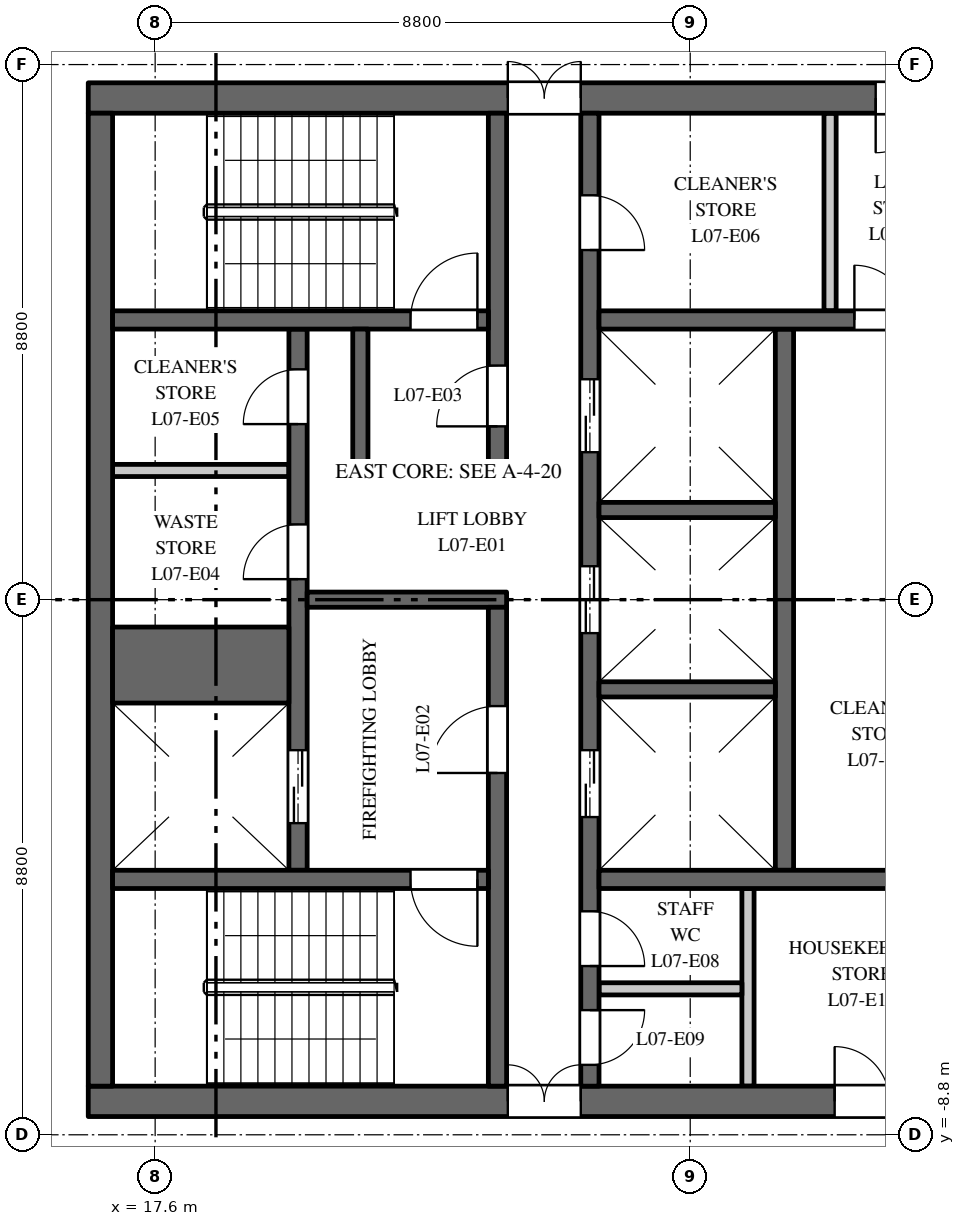
"""IFC4 building model, lengths in metres.
Left out: names, types, materials, properties, quantities, classifications, styles, units other than length and angle.
Written with IfcOpenShell. Run it as: python <this file> out.ifc"""

import sys

from ifc_helpers import new_model, si_unit, direction, frame, frame_2d, origin, place, context, subcontext, project, spatial, rectangle, extrude, element, fill, save


model = new_model("IFC4")
c1 = context("Model", 3, precision=1e-05, world=origin(), true_north=direction((0.0, 1.0)))
c2 = subcontext(c1, "Body", "Model", "MODEL_VIEW")
j1 = project(units=[si_unit("LENGTHUNIT", "METRE"), si_unit("PLANEANGLEUNIT", "RADIAN")], contexts=[c1])
p1 = place(None, origin())
s1 = spatial("IfcSite", under=j1, at=p1, CompositionType="ELEMENT")
p2 = place(p1, origin())
s2 = spatial("IfcBuilding", under=s1, at=p2, CompositionType="ELEMENT")
p3 = place(p2, frame((0.0, 0.0, 38.5)))
s3 = spatial("IfcBuildingStorey", under=s2, at=p3, CompositionType="ELEMENT", Elevation=38.5)
p4 = place(p3, frame((16.5, 8.25, 0.0), z_axis=(0.0, 0.0, 1.0), x_axis=(1.0, 0.0, 0.0)))
e1 = element("IfcWall", 1, at=p4, inside=s3, PredefinedType="SHEAR", context=c2, shape_type="SweptSolid", body=[
    extrude(rectangle(XDim=15.0, YDim=0.5, at=frame_2d((7.5, 0.0))), origin(), (0.0, 0.0, 1.0), 3.7),
])
p5 = place(p4, frame((6.9, 0.0, 0.0)))
e2 = element("IfcOpeningElement", 2, at=p5, cuts=e1, PredefinedType="OPENING", context=c2, shape_type="SweptSolid", body=[
    extrude(rectangle(XDim=1.2, YDim=2.1, at=frame_2d((0.6, 1.05))), frame((0.0, 0.26, 0.0), z_axis=(0.0, -1.0, 0.0), x_axis=(1.0, 0.0, 0.0)), (0.0, 0.0, 1.0), 0.52),
])
p6 = place(p4, frame((12.95, 0.0, 0.0)))
e3 = element("IfcOpeningElement", 3, at=p6, cuts=e1, PredefinedType="OPENING", context=c2, shape_type="SweptSolid", body=[
    extrude(rectangle(XDim=0.9, YDim=2.1, at=frame_2d((0.45, 1.05))), frame((0.0, 0.26, 0.0), z_axis=(0.0, -1.0, 0.0), x_axis=(1.0, 0.0, 0.0)), (0.0, 0.0, 1.0), 0.52),
])
p7 = place(p3, frame((16.5, -8.25, 0.0), z_axis=(0.0, 0.0, 1.0), x_axis=(1.0, 0.0, 0.0)))
e4 = element("IfcWall", 4, at=p7, inside=s3, PredefinedType="SHEAR", context=c2, shape_type="SweptSolid", body=[
    extrude(rectangle(XDim=15.0, YDim=0.5, at=frame_2d((7.5, 0.0))), origin(), (0.0, 0.0, 1.0), 3.7),
])
p8 = place(p7, frame((6.9, 0.0, 0.0)))
e5 = element("IfcOpeningElement", 5, at=p8, cuts=e4, PredefinedType="OPENING", context=c2, shape_type="SweptSolid", body=[
    extrude(rectangle(XDim=1.2, YDim=2.1, at=frame_2d((0.6, 1.05))), frame((0.0, 0.26, 0.0), z_axis=(0.0, -1.0, 0.0), x_axis=(1.0, 0.0, 0.0)), (0.0, 0.0, 1.0), 0.52),
])
p9 = place(p7, frame((12.275, 0.0, 0.0)))
e6 = element("IfcOpeningElement", 6, at=p9, cuts=e4, PredefinedType="OPENING", context=c2, shape_type="SweptSolid", body=[
    extrude(rectangle(XDim=0.9, YDim=2.1, at=frame_2d((0.45, 1.05))), frame((0.0, 0.26, 0.0), z_axis=(0.0, -1.0, 0.0), x_axis=(1.0, 0.0, 0.0)), (0.0, 0.0, 1.0), 0.52),
])
p10 = place(p3, frame((16.9, 2.125, 0.0), z_axis=(0.0, 0.0, 1.0), x_axis=(1.0, 0.0, 0.0)))
e7 = element("IfcWall", 7, at=p10, inside=s3, PredefinedType="PARTITIONING", context=c2, shape_type="SweptSolid", body=[
    extrude(rectangle(XDim=2.9, YDim=0.2, at=frame_2d((1.45, 0.0))), origin(), (0.0, 0.0, 1.0), 3.7),
])
p11 = place(p3, frame((27.95, -4.45, 0.0), z_axis=(0.0, 0.0, 1.0), x_axis=(0.0, 1.0, 0.0)))
e8 = element("IfcWall", 8, at=p11, inside=s3, PredefinedType="SHEAR", context=c2, shape_type="SweptSolid", body=[
    extrude(rectangle(XDim=8.9, YDim=0.3, at=frame_2d((4.45, 0.0))), origin(), (0.0, 0.0, 1.0), 3.7),
])
p12 = place(p3, frame((19.95, -4.45, 0.0), z_axis=(0.0, 0.0, 1.0), x_axis=(0.0, 1.0, 0.0)))
e9 = element("IfcWall", 9, at=p12, inside=s3, PredefinedType="SHEAR", context=c2, shape_type="SweptSolid", body=[
    extrude(rectangle(XDim=8.9, YDim=0.3, at=frame_2d((4.45, 0.0))), origin(), (0.0, 0.0, 1.0), 3.7),
])
p13 = place(p12, frame((0.775, 0.0, 0.0)))
e10 = element("IfcOpeningElement", 10, at=p13, cuts=e9, PredefinedType="OPENING", context=c2, shape_type="SweptSolid", body=[
    extrude(rectangle(XDim=1.2, YDim=2.1, at=frame_2d((0.6, 1.05))), frame((0.0, 0.16, 0.0), z_axis=(0.0, -1.0, 0.0), x_axis=(1.0, 0.0, 0.0)), (0.0, 0.0, 1.0), 0.32),
])
p14 = place(p12, frame((4.788, 0.0, 0.0)))
e11 = element("IfcOpeningElement", 11, at=p14, cuts=e9, PredefinedType="OPENING", context=c2, shape_type="SweptSolid", body=[
    extrude(rectangle(XDim=0.9, YDim=2.1, at=frame_2d((0.45, 1.05))), frame((0.0, 0.16, 0.0), z_axis=(0.0, -1.0, 0.0), x_axis=(1.0, 0.0, 0.0)), (0.0, 0.0, 1.0), 0.32),
])
p15 = place(p12, frame((7.337, 0.0, 0.0)))
e12 = element("IfcOpeningElement", 12, at=p15, cuts=e9, PredefinedType="OPENING", context=c2, shape_type="SweptSolid", body=[
    extrude(rectangle(XDim=0.9, YDim=2.1, at=frame_2d((0.45, 1.05))), frame((0.0, 0.16, 0.0), z_axis=(0.0, -1.0, 0.0), x_axis=(1.0, 0.0, 0.0)), (0.0, 0.0, 1.0), 0.32),
])
p16 = place(p3, frame((24.75, -8.0, 0.0), z_axis=(0.0, 0.0, 1.0), x_axis=(0.0, 1.0, 0.0)))
e13 = element("IfcWall", 13, at=p16, inside=s3, PredefinedType="SHEAR", context=c2, shape_type="SweptSolid", body=[
    extrude(rectangle(XDim=16.0, YDim=0.3, at=frame_2d((8.0, 0.0))), origin(), (0.0, 0.0, 1.0), 3.7),
])
p17 = place(p16, frame((4.425, 0.0, 0.0)))
e14 = element("IfcOpeningElement", 14, at=p17, cuts=e13, PredefinedType="OPENING", context=c2, shape_type="SweptSolid", body=[
    extrude(rectangle(XDim=1.1, YDim=2.1, at=frame_2d((0.55, 1.05))), frame((0.0, 0.16, 0.0), z_axis=(0.0, -1.0, 0.0), x_axis=(1.0, 0.0, 0.0)), (0.0, 0.0, 1.0), 0.32),
])
p18 = place(p16, frame((7.45, 0.0, 0.0)))
e15 = element("IfcOpeningElement", 15, at=p18, cuts=e13, PredefinedType="OPENING", context=c2, shape_type="SweptSolid", body=[
    extrude(rectangle(XDim=1.1, YDim=2.1, at=frame_2d((0.55, 1.05))), frame((0.0, 0.16, 0.0), z_axis=(0.0, -1.0, 0.0), x_axis=(1.0, 0.0, 0.0)), (0.0, 0.0, 1.0), 0.32),
])
p19 = place(p16, frame((10.425, 0.0, 0.0)))
e16 = element("IfcOpeningElement", 16, at=p19, cuts=e13, PredefinedType="OPENING", context=c2, shape_type="SweptSolid", body=[
    extrude(rectangle(XDim=1.2, YDim=2.1, at=frame_2d((0.6, 1.05))), frame((0.0, 0.16, 0.0), z_axis=(0.0, -1.0, 0.0), x_axis=(1.0, 0.0, 0.0)), (0.0, 0.0, 1.0), 0.32),
])
p20 = place(p16, frame((13.75, 0.0, 0.0)))
e17 = element("IfcOpeningElement", 17, at=p20, cuts=e13, PredefinedType="OPENING", context=c2, shape_type="SweptSolid", body=[
    extrude(rectangle(XDim=0.9, YDim=2.1, at=frame_2d((0.45, 1.05))), frame((0.0, 0.16, 0.0), z_axis=(0.0, -1.0, 0.0), x_axis=(1.0, 0.0, 0.0)), (0.0, 0.0, 1.0), 0.32),
])
p21 = place(p16, frame((1.975, 0.0, 0.0)))
e18 = element("IfcOpeningElement", 18, at=p21, cuts=e13, PredefinedType="OPENING", context=c2, shape_type="SweptSolid", body=[
    extrude(rectangle(XDim=0.9, YDim=2.1, at=frame_2d((0.45, 1.05))), frame((0.0, 0.16, 0.0), z_axis=(0.0, -1.0, 0.0), x_axis=(1.0, 0.0, 0.0)), (0.0, 0.0, 1.0), 0.32),
])
p22 = place(p16, frame((0.35, 0.0, 0.0)))
e19 = element("IfcOpeningElement", 19, at=p22, cuts=e13, PredefinedType="OPENING", context=c2, shape_type="SweptSolid", body=[
    extrude(rectangle(XDim=0.9, YDim=2.1, at=frame_2d((0.45, 1.05))), frame((0.0, 0.16, 0.0), z_axis=(0.0, -1.0, 0.0), x_axis=(1.0, 0.0, 0.0)), (0.0, 0.0, 1.0), 0.32),
])
p23 = place(p3, frame((20.1, 0.0, 0.0), z_axis=(0.0, 0.0, 1.0), x_axis=(1.0, 0.0, 0.0)))
e20 = element("IfcWall", 20, at=p23, inside=s3, PredefinedType="SHEAR", context=c2, shape_type="SweptSolid", body=[
    extrude(rectangle(XDim=3.28, YDim=0.25, at=frame_2d((1.64, 0.0))), origin(), (0.0, 0.0, 1.0), 3.7),
])
p24 = place(p3, frame((16.7, -8.0, 0.0), z_axis=(0.0, 0.0, 1.0), x_axis=(0.0, 1.0, 0.0)))
e21 = element("IfcWall", 21, at=p24, inside=s3, PredefinedType="SHEAR", context=c2, shape_type="SweptSolid", body=[
    extrude(rectangle(XDim=16.0, YDim=0.4, at=frame_2d((8.0, 0.0))), origin(), (0.0, 0.0, 1.0), 3.7),
])
p25 = place(p3, frame((24.9, 4.6, 0.0), z_axis=(0.0, 0.0, 1.0), x_axis=(1.0, 0.0, 0.0)))
e22 = element("IfcWall", 22, at=p25, inside=s3, PredefinedType="SHEAR", context=c2, shape_type="SweptSolid", body=[
    extrude(rectangle(XDim=6.1, YDim=0.3, at=frame_2d((3.05, 0.0))), origin(), (0.0, 0.0, 1.0), 3.7),
])
p26 = place(p25, frame((4.2, 0.0, 0.0)))
e23 = element("IfcOpeningElement", 23, at=p26, cuts=e22, PredefinedType="OPENING", context=c2, shape_type="SweptSolid", body=[
    extrude(rectangle(XDim=0.9, YDim=2.1, at=frame_2d((0.45, 1.05))), frame((0.0, 0.16, 0.0), z_axis=(0.0, -1.0, 0.0), x_axis=(1.0, 0.0, 0.0)), (0.0, 0.0, 1.0), 0.32),
])
for number, where, z_axis, x_axis in (
    (24, (28.7, 4.75, 0.0), (0.0, 0.0, 1.0), (0.0, 1.0, 0.0)),
    (25, (27.35, -8.0, 0.0), (0.0, 0.0, 1.0), (0.0, 1.0, 0.0)),
):
    element("IfcWall", number, at=place(p3, frame(where, z_axis=z_axis, x_axis=x_axis)), inside=s3, PredefinedType="PARTITIONING", context=c2, shape_type="SweptSolid", body=[
        extrude(rectangle(XDim=3.25, YDim=0.2, at=frame_2d((1.625, 0.0))), origin(), (0.0, 0.0, 1.0), 3.7),
    ])
p27 = place(p3, frame((24.9, -6.4, 0.0), z_axis=(0.0, 0.0, 1.0), x_axis=(1.0, 0.0, 0.0)))
e26 = element("IfcWall", 26, at=p27, inside=s3, PredefinedType="PARTITIONING", context=c2, shape_type="SweptSolid", body=[
    extrude(rectangle(XDim=2.35, YDim=0.2, at=frame_2d((1.175, 0.0))), origin(), (0.0, 0.0, 1.0), 3.7),
])
p28 = place(p3, frame((24.9, -4.6, 0.0), z_axis=(0.0, 0.0, 1.0), x_axis=(1.0, 0.0, 0.0)))
e27 = element("IfcWall", 27, at=p28, inside=s3, PredefinedType="SHEAR", context=c2, shape_type="SweptSolid", body=[
    extrude(rectangle(XDim=6.1, YDim=0.3, at=frame_2d((3.05, 0.0))), origin(), (0.0, 0.0, 1.0), 3.7),
])
p29 = place(p3, frame((16.9, -1.075, 0.0), z_axis=(0.0, 0.0, 1.0), x_axis=(1.0, 0.0, 0.0)))
e28 = element("IfcWall", 28, at=p29, inside=s3, PredefinedType="SHEAR", context=c2, shape_type="SweptSolid", body=[
    extrude(rectangle(XDim=2.9, YDim=1.25, at=frame_2d((1.45, 0.0))), origin(), (0.0, 0.0, 1.0), 3.7),
])
for number, where, z_axis, x_axis in (
    (29, (24.9, -1.475, 0.0), (0.0, 0.0, 1.0), (1.0, 0.0, 0.0)),
    (30, (24.9, 1.475, 0.0), (0.0, 0.0, 1.0), (1.0, 0.0, 0.0)),
):
    element("IfcWall", number, at=place(p3, frame(where, z_axis=z_axis, x_axis=x_axis)), inside=s3, PredefinedType="SHEAR", context=c2, shape_type="SweptSolid", body=[
        extrude(rectangle(XDim=2.9, YDim=0.25, at=frame_2d((1.45, 0.0))), origin(), (0.0, 0.0, 1.0), 3.7),
    ])
p30 = place(p3, frame((23.23, 2.25, 0.0), z_axis=(0.0, 0.0, 1.0), x_axis=(0.0, 1.0, 0.0)))
e31 = element("IfcWall", 31, at=p30, inside=s3, PredefinedType="SHEAR", context=c2, shape_type="SweptSolid", body=[
    extrude(rectangle(XDim=5.75, YDim=0.3, at=frame_2d((2.875, 0.0))), origin(), (0.0, 0.0, 1.0), 3.7),
])
p31 = place(p30, frame((0.6, 0.0, 0.0)))
e32 = element("IfcOpeningElement", 32, at=p31, cuts=e31, PredefinedType="OPENING", context=c2, shape_type="SweptSolid", body=[
    extrude(rectangle(XDim=1.0, YDim=2.1, at=frame_2d((0.5, 1.05))), frame((0.0, 0.16, 0.0), z_axis=(0.0, -1.0, 0.0), x_axis=(1.0, 0.0, 0.0)), (0.0, 0.0, 1.0), 0.32),
])
p32 = place(p3, frame((23.23, -8.0, 0.0), z_axis=(0.0, 0.0, 1.0), x_axis=(0.0, 1.0, 0.0)))
e33 = element("IfcWall", 33, at=p32, inside=s3, PredefinedType="SHEAR", context=c2, shape_type="SweptSolid", body=[
    extrude(rectangle(XDim=7.875, YDim=0.3, at=frame_2d((3.938, 0.0))), origin(), (0.0, 0.0, 1.0), 3.7),
])
p33 = place(p32, frame((5.15, 0.0, 0.0)))
e34 = element("IfcOpeningElement", 34, at=p33, cuts=e33, PredefinedType="OPENING", context=c2, shape_type="SweptSolid", body=[
    extrude(rectangle(XDim=1.1, YDim=2.1, at=frame_2d((0.55, 1.05))), frame((0.0, 0.16, 0.0), z_axis=(0.0, -1.0, 0.0), x_axis=(1.0, 0.0, 0.0)), (0.0, 0.0, 1.0), 0.32),
])
p34 = place(p3, frame((16.9, 4.6, 0.0), z_axis=(0.0, 0.0, 1.0), x_axis=(1.0, 0.0, 0.0)))
e35 = element("IfcWall", 35, at=p34, inside=s3, PredefinedType="SHEAR", context=c2, shape_type="SweptSolid", body=[
    extrude(rectangle(XDim=6.18, YDim=0.3, at=frame_2d((3.09, 0.0))), origin(), (0.0, 0.0, 1.0), 3.7),
])
p35 = place(p34, frame((4.9, 0.0, 0.0)))
e36 = element("IfcOpeningElement", 36, at=p35, cuts=e35, PredefinedType="OPENING", context=c2, shape_type="SweptSolid", body=[
    extrude(rectangle(XDim=1.1, YDim=2.1, at=frame_2d((0.55, 1.05))), frame((0.0, 0.16, 0.0), z_axis=(0.0, -1.0, 0.0), x_axis=(1.0, 0.0, 0.0)), (0.0, 0.0, 1.0), 0.32),
])
p36 = place(p3, frame((16.9, -4.6, 0.0), z_axis=(0.0, 0.0, 1.0), x_axis=(1.0, 0.0, 0.0)))
e37 = element("IfcWall", 37, at=p36, inside=s3, PredefinedType="SHEAR", context=c2, shape_type="SweptSolid", body=[
    extrude(rectangle(XDim=6.18, YDim=0.3, at=frame_2d((3.09, 0.0))), origin(), (0.0, 0.0, 1.0), 3.7),
])
p37 = place(p36, frame((4.9, 0.0, 0.0)))
e38 = element("IfcOpeningElement", 38, at=p37, cuts=e37, PredefinedType="OPENING", context=c2, shape_type="SweptSolid", body=[
    extrude(rectangle(XDim=1.1, YDim=2.1, at=frame_2d((0.55, 1.05))), frame((0.0, 0.16, 0.0), z_axis=(0.0, -1.0, 0.0), x_axis=(1.0, 0.0, 0.0)), (0.0, 0.0, 1.0), 0.32),
])
p38 = place(p3, frame((20.85, 2.125, 0.0), z_axis=(0.0, 0.0, 1.0), x_axis=(1.0, 0.0, 0.0)))
e39 = element("IfcWall", 39, at=p38, inside=s3, PredefinedType="SHEAR", context=c2, shape_type="SweptSolid", body=[
    extrude(rectangle(XDim=2.53, YDim=0.25, at=frame_2d((1.265, 0.0))), origin(), (0.0, 0.0, 1.0), 3.7),
])
p39 = place(p3, frame((20.975, 2.25, 0.0), z_axis=(0.0, 0.0, 1.0), x_axis=(0.0, 1.0, 0.0)))
e40 = element("IfcWall", 40, at=p39, inside=s3, PredefinedType="SHEAR", context=c2, shape_type="SweptSolid", body=[
    extrude(rectangle(XDim=2.2, YDim=0.25, at=frame_2d((1.1, 0.0))), origin(), (0.0, 0.0, 1.0), 3.7),
])
p40 = place(p13, origin())
e41 = element("IfcDoor", 41, at=p40, inside=s3, OperationType="DOUBLE_DOOR_SLIDING", PredefinedType="DOOR", context=c2, shape_type="SweptSolid", body=[
    extrude(rectangle(XDim=1.2, YDim=2.1, at=frame_2d((0.6, 1.05))), frame((0.0, 0.025, 0.0), z_axis=(0.0, -1.0, 0.0), x_axis=(1.0, 0.0, 0.0)), (0.0, 0.0, 1.0), 0.05),
])
fill(e10, e41)
p41 = place(p17, origin())
e42 = element("IfcDoor", 42, at=p41, inside=s3, OperationType="DOUBLE_DOOR_SLIDING", PredefinedType="DOOR", context=c2, shape_type="SweptSolid", body=[
    extrude(rectangle(XDim=1.1, YDim=2.1, at=frame_2d((0.55, 1.05))), frame((0.0, 0.025, 0.0), z_axis=(0.0, -1.0, 0.0), x_axis=(1.0, 0.0, 0.0)), (0.0, 0.0, 1.0), 0.05),
])
fill(e14, e42)
p42 = place(p18, origin())
e43 = element("IfcDoor", 43, at=p42, inside=s3, OperationType="DOUBLE_DOOR_SLIDING", PredefinedType="DOOR", context=c2, shape_type="SweptSolid", body=[
    extrude(rectangle(XDim=1.1, YDim=2.1, at=frame_2d((0.55, 1.05))), frame((0.0, 0.025, 0.0), z_axis=(0.0, -1.0, 0.0), x_axis=(1.0, 0.0, 0.0)), (0.0, 0.0, 1.0), 0.05),
])
fill(e15, e43)
p43 = place(p19, origin())
e44 = element("IfcDoor", 44, at=p43, inside=s3, OperationType="DOUBLE_DOOR_SLIDING", PredefinedType="DOOR", context=c2, shape_type="SweptSolid", body=[
    extrude(rectangle(XDim=1.2, YDim=2.1, at=frame_2d((0.6, 1.05))), frame((0.0, 0.025, 0.0), z_axis=(0.0, -1.0, 0.0), x_axis=(1.0, 0.0, 0.0)), (0.0, 0.0, 1.0), 0.05),
])
fill(e16, e44)
p44 = place(p35, origin())
e45 = element("IfcDoor", 45, at=p44, inside=s3, OperationType="SINGLE_SWING_LEFT", PredefinedType="DOOR", context=c2, shape_type="SweptSolid", body=[
    extrude(rectangle(XDim=1.1, YDim=2.1, at=frame_2d((0.55, 1.05))), frame((0.0, 0.025, 0.0), z_axis=(0.0, -1.0, 0.0), x_axis=(1.0, 0.0, 0.0)), (0.0, 0.0, 1.0), 0.05),
])
fill(e36, e45)
p45 = place(p37, origin())
e46 = element("IfcDoor", 46, at=p45, inside=s3, OperationType="SINGLE_SWING_RIGHT", PredefinedType="DOOR", context=c2, shape_type="SweptSolid", body=[
    extrude(rectangle(XDim=1.1, YDim=2.1, at=frame_2d((0.55, 1.05))), frame((0.0, 0.025, 0.0), z_axis=(0.0, -1.0, 0.0), x_axis=(1.0, 0.0, 0.0)), (0.0, 0.0, 1.0), 0.05),
])
fill(e38, e46)
p46 = place(p33, origin())
e47 = element("IfcDoor", 47, at=p46, inside=s3, OperationType="SINGLE_SWING_RIGHT", PredefinedType="DOOR", context=c2, shape_type="SweptSolid", body=[
    extrude(rectangle(XDim=1.1, YDim=2.1, at=frame_2d((0.55, 1.05))), frame((0.0, 0.025, 0.0), z_axis=(0.0, -1.0, 0.0), x_axis=(1.0, 0.0, 0.0)), (0.0, 0.0, 1.0), 0.05),
])
fill(e34, e47)
p47 = place(p31, origin())
e48 = element("IfcDoor", 48, at=p47, inside=s3, OperationType="SINGLE_SWING_RIGHT", PredefinedType="DOOR", context=c2, shape_type="SweptSolid", body=[
    extrude(rectangle(XDim=1.0, YDim=2.1, at=frame_2d((0.5, 1.05))), frame((0.0, 0.025, 0.0), z_axis=(0.0, -1.0, 0.0), x_axis=(1.0, 0.0, 0.0)), (0.0, 0.0, 1.0), 0.05),
])
fill(e32, e48)
p48 = place(p5, origin())
e49 = element("IfcDoor", 49, at=p48, inside=s3, OperationType="DOUBLE_DOOR_DOUBLE_SWING", PredefinedType="DOOR", context=c2, shape_type="SweptSolid", body=[
    extrude(rectangle(XDim=1.2, YDim=2.1, at=frame_2d((0.6, 1.05))), frame((0.0, 0.025, 0.0), z_axis=(0.0, -1.0, 0.0), x_axis=(1.0, 0.0, 0.0)), (0.0, 0.0, 1.0), 0.05),
])
fill(e2, e49)
p49 = place(p8, origin())
e50 = element("IfcDoor", 50, at=p49, inside=s3, OperationType="DOUBLE_DOOR_DOUBLE_SWING", PredefinedType="DOOR", context=c2, shape_type="SweptSolid", body=[
    extrude(rectangle(XDim=1.2, YDim=2.1, at=frame_2d((0.6, 1.05))), frame((0.0, 0.025, 0.0), z_axis=(0.0, -1.0, 0.0), x_axis=(1.0, 0.0, 0.0)), (0.0, 0.0, 1.0), 0.05),
])
fill(e5, e50)
p50 = place(p14, origin())
e51 = element("IfcDoor", 51, at=p50, inside=s3, OperationType="SINGLE_SWING_RIGHT", PredefinedType="DOOR", context=c2, shape_type="SweptSolid", body=[
    extrude(rectangle(XDim=0.9, YDim=2.1, at=frame_2d((0.45, 1.05))), frame((0.0, 0.025, 0.0), z_axis=(0.0, -1.0, 0.0), x_axis=(1.0, 0.0, 0.0)), (0.0, 0.0, 1.0), 0.05),
])
fill(e11, e51)
p51 = place(p15, origin())
e52 = element("IfcDoor", 52, at=p51, inside=s3, OperationType="SINGLE_SWING_RIGHT", PredefinedType="DOOR", context=c2, shape_type="SweptSolid", body=[
    extrude(rectangle(XDim=0.9, YDim=2.1, at=frame_2d((0.45, 1.05))), frame((0.0, 0.025, 0.0), z_axis=(0.0, -1.0, 0.0), x_axis=(1.0, 0.0, 0.0)), (0.0, 0.0, 1.0), 0.05),
])
fill(e12, e52)
p52 = place(p20, origin())
e53 = element("IfcDoor", 53, at=p52, inside=s3, OperationType="SINGLE_SWING_LEFT", PredefinedType="DOOR", context=c2, shape_type="SweptSolid", body=[
    extrude(rectangle(XDim=0.9, YDim=2.1, at=frame_2d((0.45, 1.05))), frame((0.0, 0.025, 0.0), z_axis=(0.0, -1.0, 0.0), x_axis=(1.0, 0.0, 0.0)), (0.0, 0.0, 1.0), 0.05),
])
fill(e17, e53)
p53 = place(p6, origin())
e54 = element("IfcDoor", 54, at=p53, inside=s3, OperationType="SINGLE_SWING_LEFT", PredefinedType="DOOR", context=c2, shape_type="SweptSolid", body=[
    extrude(rectangle(XDim=0.9, YDim=2.1, at=frame_2d((0.45, 1.05))), frame((0.0, 0.025, 0.0), z_axis=(0.0, -1.0, 0.0), x_axis=(1.0, 0.0, 0.0)), (0.0, 0.0, 1.0), 0.05),
])
fill(e3, e54)
p54 = place(p21, origin())
e55 = element("IfcDoor", 55, at=p54, inside=s3, OperationType="SINGLE_SWING_LEFT", PredefinedType="DOOR", context=c2, shape_type="SweptSolid", body=[
    extrude(rectangle(XDim=0.9, YDim=2.1, at=frame_2d((0.45, 1.05))), frame((0.0, 0.025, 0.0), z_axis=(0.0, -1.0, 0.0), x_axis=(1.0, 0.0, 0.0)), (0.0, 0.0, 1.0), 0.05),
])
fill(e18, e55)
p55 = place(p22, origin())
e56 = element("IfcDoor", 56, at=p55, inside=s3, OperationType="SINGLE_SWING_RIGHT", PredefinedType="DOOR", context=c2, shape_type="SweptSolid", body=[
    extrude(rectangle(XDim=0.9, YDim=2.1, at=frame_2d((0.45, 1.05))), frame((0.0, 0.025, 0.0), z_axis=(0.0, -1.0, 0.0), x_axis=(1.0, 0.0, 0.0)), (0.0, 0.0, 1.0), 0.05),
])
fill(e19, e56)
p56 = place(p9, origin())
e57 = element("IfcDoor", 57, at=p56, inside=s3, OperationType="SINGLE_SWING_RIGHT", PredefinedType="DOOR", context=c2, shape_type="SweptSolid", body=[
    extrude(rectangle(XDim=0.9, YDim=2.1, at=frame_2d((0.45, 1.05))), frame((0.0, 0.025, 0.0), z_axis=(0.0, -1.0, 0.0), x_axis=(1.0, 0.0, 0.0)), (0.0, 0.0, 1.0), 0.05),
])
fill(e6, e57)
p57 = place(p26, origin())
e58 = element("IfcDoor", 58, at=p57, inside=s3, OperationType="SINGLE_SWING_RIGHT", PredefinedType="DOOR", context=c2, shape_type="SweptSolid", body=[
    extrude(rectangle(XDim=0.9, YDim=2.1, at=frame_2d((0.45, 1.05))), frame((0.0, 0.025, 0.0), z_axis=(0.0, -1.0, 0.0), x_axis=(1.0, 0.0, 0.0)), (0.0, 0.0, 1.0), 0.05),
])
fill(e23, e58)
save(model, sys.argv[1])
